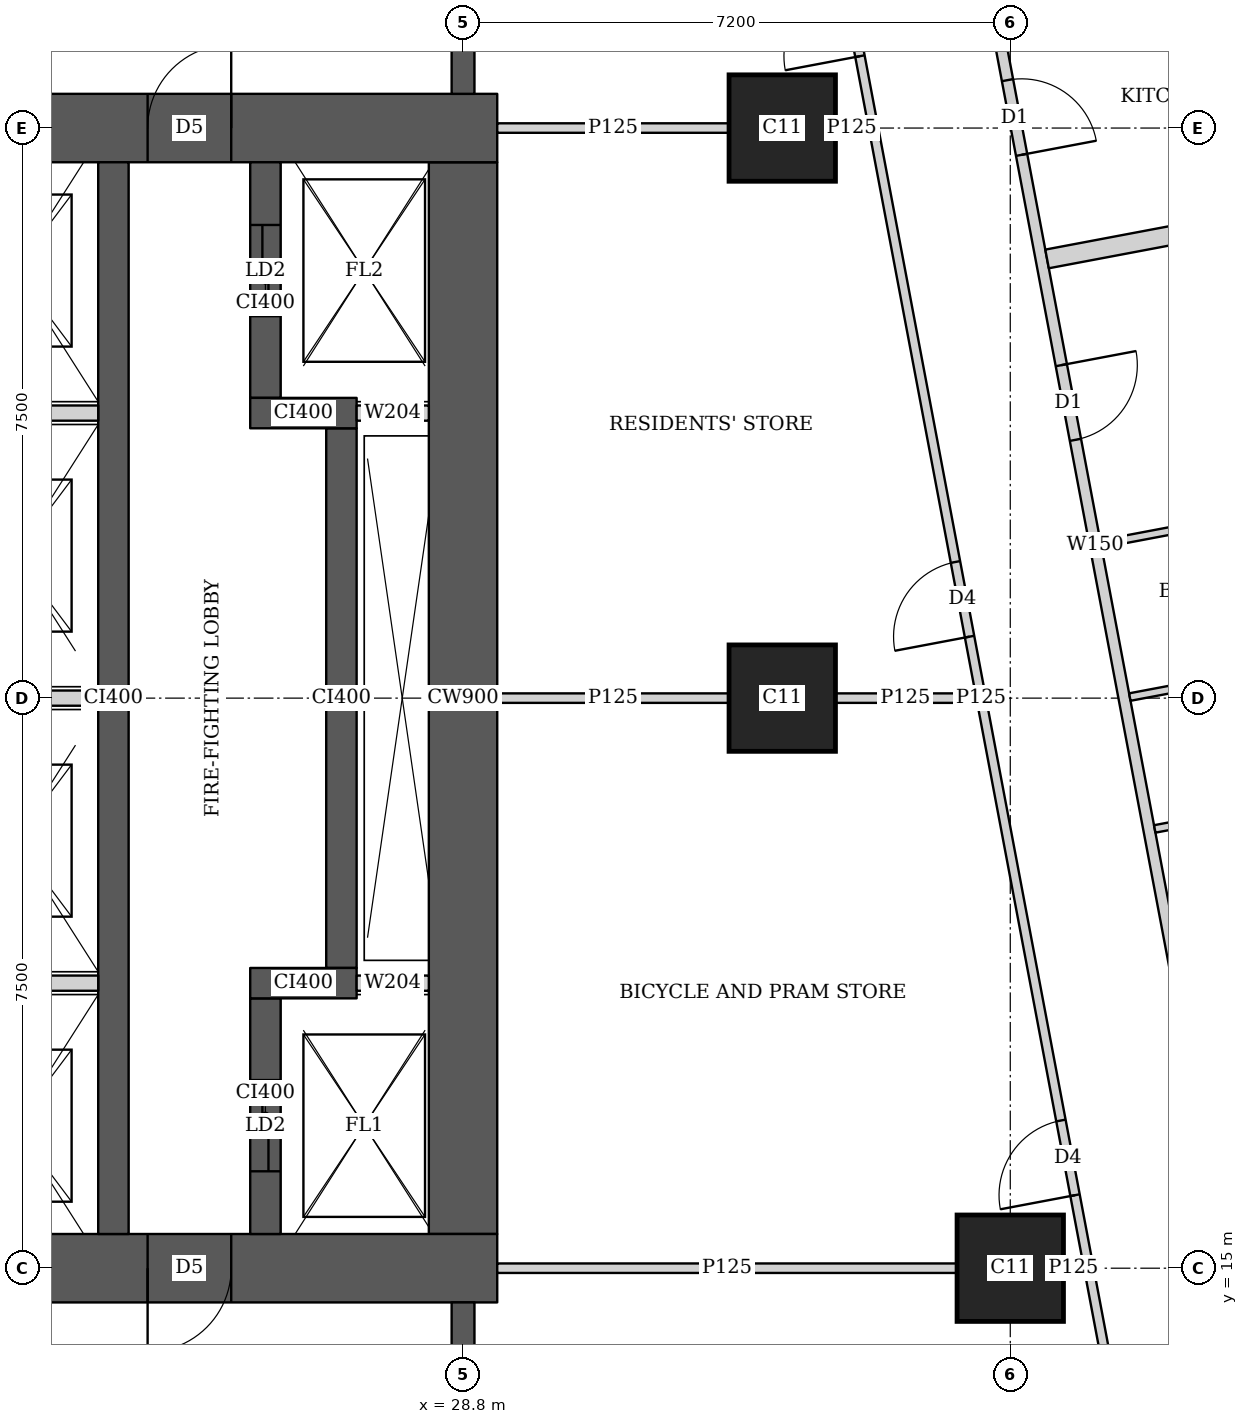
"""IFC4 building model, lengths in metres.
Left out: names, types, materials, properties, quantities, classifications, styles, units other than length and angle.
Written with IfcOpenShell. Run it as: python <this file> out.ifc"""

import sys

from ifc_helpers import new_model, si_unit, direction, frame, frame_2d, origin, origin_2d, place, context, subcontext, project, spatial, rectangle, extrude, element, fill, save


model = new_model("IFC4")
c1 = context("Model", 3, precision=1e-05, world=origin(), true_north=direction((0.0, 1.0)))
c2 = subcontext(c1, "Body", "Model", "MODEL_VIEW")
j1 = project(units=[si_unit("LENGTHUNIT", "METRE"), si_unit("PLANEANGLEUNIT", "RADIAN")], contexts=[c1])
p1 = place(None, origin())
s1 = spatial("IfcSite", under=j1, at=p1, CompositionType="ELEMENT")
p2 = place(p1, origin())
s2 = spatial("IfcBuilding", under=s1, at=p2, CompositionType="ELEMENT")
p3 = place(p2, frame((0.0, 0.0, 281.6)))
s3 = spatial("IfcBuildingStorey", under=s2, at=p3, CompositionType="ELEMENT", Elevation=281.6)
for number, where, z_axis, x_axis in (
    (1, (36.0, 15.0, 0.0), (0.0, 0.0, 1.0), (1.0, 0.0, 0.0)),
    (2, (33.0, 22.5, 0.0), (0.0, 0.0, 1.0), (1.0, 0.0, 0.0)),
    (3, (33.0, 30.0, 0.0), (0.0, 0.0, 1.0), (1.0, 0.0, 0.0)),
):
    element("IfcColumn", number, at=place(p3, frame(where, z_axis=z_axis, x_axis=x_axis)), inside=s3, PredefinedType="COLUMN", context=c2, shape_type="SweptSolid", body=[
        extrude(rectangle(XDim=1.4, YDim=1.4, at=origin_2d()), origin(), (0.0, 0.0, 1.0), 3.75),
    ])
p4 = place(p3, frame((13.95, 15.0, 0.0), z_axis=(0.0, 0.0, 1.0), x_axis=(1.0, 0.0, 0.0)))
e4 = element("IfcWall", 4, at=p4, inside=s3, PredefinedType="SHEAR", context=c2, shape_type="SweptSolid", body=[
    extrude(rectangle(XDim=15.3, YDim=0.9, at=frame_2d((7.65, 0.0))), origin(), (0.0, 0.0, 1.0), 3.75),
])
p5 = place(p4, frame((4.45, 0.0, 0.0)))
e5 = element("IfcOpeningElement", 5, at=p5, cuts=e4, PredefinedType="OPENING", context=c2, shape_type="SweptSolid", body=[
    extrude(rectangle(XDim=1.8, YDim=2.1, at=frame_2d((0.9, 1.05))), frame((0.0, 0.46, 0.0), z_axis=(0.0, -1.0, 0.0), x_axis=(1.0, 0.0, 0.0)), (0.0, 0.0, 1.0), 0.92),
])
p6 = place(p4, frame((10.7, 0.0, 0.0)))
e6 = element("IfcOpeningElement", 6, at=p6, cuts=e4, PredefinedType="OPENING", context=c2, shape_type="SweptSolid", body=[
    extrude(rectangle(XDim=1.1, YDim=2.1, at=frame_2d((0.55, 1.05))), frame((0.0, 0.46, 0.0), z_axis=(0.0, -1.0, 0.0), x_axis=(1.0, 0.0, 0.0)), (0.0, 0.0, 1.0), 0.92),
])
p7 = place(p3, frame((13.95, 30.0, 0.0), z_axis=(0.0, 0.0, 1.0), x_axis=(1.0, 0.0, 0.0)))
e7 = element("IfcWall", 7, at=p7, inside=s3, PredefinedType="SHEAR", context=c2, shape_type="SweptSolid", body=[
    extrude(rectangle(XDim=15.3, YDim=0.9, at=frame_2d((7.65, 0.0))), origin(), (0.0, 0.0, 1.0), 3.75),
])
p8 = place(p7, frame((4.45, 0.0, 0.0)))
e8 = element("IfcOpeningElement", 8, at=p8, cuts=e7, PredefinedType="OPENING", context=c2, shape_type="SweptSolid", body=[
    extrude(rectangle(XDim=1.8, YDim=2.1, at=frame_2d((0.9, 1.05))), frame((0.0, 0.46, 0.0), z_axis=(0.0, -1.0, 0.0), x_axis=(1.0, 0.0, 0.0)), (0.0, 0.0, 1.0), 0.92),
])
p9 = place(p7, frame((10.7, 0.0, 0.0)))
e9 = element("IfcOpeningElement", 9, at=p9, cuts=e7, PredefinedType="OPENING", context=c2, shape_type="SweptSolid", body=[
    extrude(rectangle(XDim=1.1, YDim=2.1, at=frame_2d((0.55, 1.05))), frame((0.0, 0.46, 0.0), z_axis=(0.0, -1.0, 0.0), x_axis=(1.0, 0.0, 0.0)), (0.0, 0.0, 1.0), 0.92),
])
p10 = place(p3, frame((28.8, 15.45, 0.0), z_axis=(0.0, 0.0, 1.0), x_axis=(0.0, 1.0, 0.0)))
e10 = element("IfcWall", 10, at=p10, inside=s3, PredefinedType="SHEAR", context=c2, shape_type="SweptSolid", body=[
    extrude(rectangle(XDim=14.1, YDim=0.9, at=frame_2d((7.05, 0.0))), origin(), (0.0, 0.0, 1.0), 3.75),
])
p11 = place(p3, frame((24.2, 15.45, 0.0), z_axis=(0.0, 0.0, 1.0), x_axis=(0.0, 1.0, 0.0)))
e11 = element("IfcWall", 11, at=p11, inside=s3, PredefinedType="SHEAR", context=c2, shape_type="SweptSolid", body=[
    extrude(rectangle(XDim=14.1, YDim=0.4, at=frame_2d((7.05, 0.0))), origin(), (0.0, 0.0, 1.0), 3.75),
])
p12 = place(p3, frame((26.2, 15.45, 0.0), z_axis=(0.0, 0.0, 1.0), x_axis=(0.0, 1.0, 0.0)))
e12 = element("IfcWall", 12, at=p12, inside=s3, PredefinedType="SHEAR", context=c2, shape_type="SweptSolid", body=[
    extrude(rectangle(XDim=3.1, YDim=0.4, at=frame_2d((1.55, 0.0))), origin(), (0.0, 0.0, 1.0), 3.75),
])
p13 = place(p12, frame((0.825, 0.0, 0.0)))
e13 = element("IfcOpeningElement", 13, at=p13, cuts=e12, PredefinedType="OPENING", context=c2, shape_type="SweptSolid", body=[
    extrude(rectangle(XDim=1.2, YDim=2.1, at=frame_2d((0.6, 1.05))), frame((0.0, 0.21, 0.0), z_axis=(0.0, -1.0, 0.0), x_axis=(1.0, 0.0, 0.0)), (0.0, 0.0, 1.0), 0.42),
])
p14 = place(p3, frame((26.0, 18.75, 0.0), z_axis=(0.0, 0.0, 1.0), x_axis=(1.0, 0.0, 0.0)))
e14 = element("IfcWall", 14, at=p14, inside=s3, PredefinedType="SHEAR", context=c2, shape_type="SweptSolid", body=[
    extrude(rectangle(XDim=1.4, YDim=0.4, at=frame_2d((0.7, 0.0))), origin(), (0.0, 0.0, 1.0), 3.75),
])
p15 = place(p3, frame((27.2, 18.95, 0.0), z_axis=(0.0, 0.0, 1.0), x_axis=(0.0, 1.0, 0.0)))
e15 = element("IfcWall", 15, at=p15, inside=s3, PredefinedType="SHEAR", context=c2, shape_type="SweptSolid", body=[
    extrude(rectangle(XDim=7.1, YDim=0.4, at=frame_2d((3.55, 0.0))), origin(), (0.0, 0.0, 1.0), 3.75),
])
p16 = place(p3, frame((26.0, 26.25, 0.0), z_axis=(0.0, 0.0, 1.0), x_axis=(1.0, 0.0, 0.0)))
e16 = element("IfcWall", 16, at=p16, inside=s3, PredefinedType="SHEAR", context=c2, shape_type="SweptSolid", body=[
    extrude(rectangle(XDim=1.4, YDim=0.4, at=frame_2d((0.7, 0.0))), origin(), (0.0, 0.0, 1.0), 3.75),
])
p17 = place(p3, frame((26.2, 26.45, 0.0), z_axis=(0.0, 0.0, 1.0), x_axis=(0.0, 1.0, 0.0)))
e17 = element("IfcWall", 17, at=p17, inside=s3, PredefinedType="SHEAR", context=c2, shape_type="SweptSolid", body=[
    extrude(rectangle(XDim=3.1, YDim=0.4, at=frame_2d((1.55, 0.0))), origin(), (0.0, 0.0, 1.0), 3.75),
])
p18 = place(p17, frame((1.075, 0.0, 0.0)))
e18 = element("IfcOpeningElement", 18, at=p18, cuts=e17, PredefinedType="OPENING", context=c2, shape_type="SweptSolid", body=[
    extrude(rectangle(XDim=1.2, YDim=2.1, at=frame_2d((0.6, 1.05))), frame((0.0, 0.21, 0.0), z_axis=(0.0, -1.0, 0.0), x_axis=(1.0, 0.0, 0.0)), (0.0, 0.0, 1.0), 0.42),
])
for number, where, z_axis, x_axis in (
    (19, (28.8, 10.35, 0.0), (0.0, 0.0, 1.0), (0.0, 1.0, 0.0)),
    (20, (28.8, 30.45, 0.0), (0.0, 0.0, 1.0), (0.0, 1.0, 0.0)),
):
    element("IfcWall", number, at=place(p3, frame(where, z_axis=z_axis, x_axis=x_axis)), inside=s3, PredefinedType="SHEAR", context=c2, shape_type="SweptSolid", body=[
        extrude(rectangle(XDim=4.2, YDim=0.3, at=frame_2d((2.1, 0.0))), origin(), (0.0, 0.0, 1.0), 3.75),
    ])
p19 = place(p3, frame((33.781, 42.186, 0.0), z_axis=(0.0, 0.0, 1.0), x_axis=(0.185593518645, -0.9826266055, 0.0)))
e21 = element("IfcWall", 21, at=p19, inside=s3, PredefinedType="SOLIDWALL", context=c2, shape_type="SweptSolid", body=[
    extrude(rectangle(XDim=35.961, YDim=0.15, at=frame_2d((17.98, 0.0))), origin(), (0.0, 0.0, 1.0), 2.5),
])
p20 = place(p19, frame((11.76, 0.0, 0.0)))
e22 = element("IfcOpeningElement", 22, at=p20, cuts=e21, PredefinedType="OPENING", context=c2, shape_type="SweptSolid", body=[
    extrude(rectangle(XDim=1.0, YDim=2.1, at=frame_2d((0.5, 1.05))), frame((0.0, 0.085, 0.0), z_axis=(0.0, -1.0, 0.0), x_axis=(1.0, 0.0, 0.0)), (0.0, 0.0, 1.0), 0.17),
])
p21 = place(p19, frame((15.576, 0.0, 0.0)))
e23 = element("IfcOpeningElement", 23, at=p21, cuts=e21, PredefinedType="OPENING", context=c2, shape_type="SweptSolid", body=[
    extrude(rectangle(XDim=1.0, YDim=2.1, at=frame_2d((0.5, 1.05))), frame((0.0, 0.085, 0.0), z_axis=(0.0, -1.0, 0.0), x_axis=(1.0, 0.0, 0.0)), (0.0, 0.0, 1.0), 0.17),
])
p22 = place(p19, frame((30.502, 0.0, 0.0)))
e24 = element("IfcOpeningElement", 24, at=p22, cuts=e21, PredefinedType="OPENING", context=c2, shape_type="SweptSolid", body=[
    extrude(rectangle(XDim=1.0, YDim=2.1, at=frame_2d((0.5, 1.05))), frame((0.0, 0.085, 0.0), z_axis=(0.0, -1.0, 0.0), x_axis=(1.0, 0.0, 0.0)), (0.0, 0.0, 1.0), 0.17),
])
p23 = place(p3, frame((40.657, 25.183, 0.0), z_axis=(0.0, 0.0, 1.0), x_axis=(-0.982585626838, -0.185810349366, 0.0)))
e25 = element("IfcWall", 25, at=p23, inside=s3, PredefinedType="PARTITIONING", context=c2, shape_type="SweptSolid", body=[
    extrude(rectangle(XDim=3.525, YDim=0.1, at=frame_2d((1.763, 0.0))), origin(), (0.0, 0.0, 1.0), 3.5),
])
p24 = place(p3, frame((41.365, 21.433, 0.0), z_axis=(0.0, 0.0, 1.0), x_axis=(-0.982638553676, -0.185530247748, 0.0)))
e26 = element("IfcWall", 26, at=p24, inside=s3, PredefinedType="PARTITIONING", context=c2, shape_type="SweptSolid", body=[
    extrude(rectangle(XDim=3.525, YDim=0.1, at=frame_2d((1.763, 0.0))), origin(), (0.0, 0.0, 1.0), 3.5),
])
p25 = place(p3, frame((41.037, 23.168, 0.0), z_axis=(0.0, 0.0, 1.0), x_axis=(-0.982638553676, -0.185530247748, 0.0)))
e27 = element("IfcWall", 27, at=p25, inside=s3, PredefinedType="PARTITIONING", context=c2, shape_type="SweptSolid", body=[
    extrude(rectangle(XDim=3.525, YDim=0.1, at=frame_2d((1.763, 0.0))), origin(), (0.0, 0.0, 1.0), 2.5),
])
p26 = place(p3, frame((41.177, 29.164, 0.0), z_axis=(0.0, 0.0, 1.0), x_axis=(-0.982642846239, -0.185507511263, 0.0)))
e28 = element("IfcWall", 28, at=p26, inside=s3, PredefinedType="SOLIDWALL", context=c2, shape_type="SweptSolid", body=[
    extrude(rectangle(XDim=4.776, YDim=0.25, at=frame_2d((2.388, 0.0))), origin(), (0.0, 0.0, 1.0), 2.5),
])
p27 = place(p3, frame((37.947, 10.163, 0.0), z_axis=(0.0, 0.0, 1.0), x_axis=(-0.185572770922, 0.982630523998, 0.0)))
e29 = element("IfcWall", 29, at=p27, inside=s3, PredefinedType="PARTITIONING", context=c2, shape_type="SweptSolid", body=[
    extrude(rectangle(XDim=25.111, YDim=0.125, at=frame_2d((12.556, 0.0))), origin(), (0.0, 0.0, 1.0), 2.5),
])
p28 = place(p27, frame((0.708, 0.0, 0.0)))
e30 = element("IfcOpeningElement", 30, at=p28, cuts=e29, PredefinedType="OPENING", context=c2, shape_type="SweptSolid", body=[
    extrude(rectangle(XDim=1.0, YDim=2.1, at=frame_2d((0.5, 1.05))), frame((0.0, 0.073, 0.0), z_axis=(0.0, -1.0, 0.0), x_axis=(1.0, 0.0, 0.0)), (0.0, 0.0, 1.0), 0.145),
])
p29 = place(p27, frame((5.9, 0.0, 0.0)))
e31 = element("IfcOpeningElement", 31, at=p29, cuts=e29, PredefinedType="OPENING", context=c2, shape_type="SweptSolid", body=[
    extrude(rectangle(XDim=1.0, YDim=2.1, at=frame_2d((0.5, 1.05))), frame((0.0, 0.073, 0.0), z_axis=(0.0, -1.0, 0.0), x_axis=(1.0, 0.0, 0.0)), (0.0, 0.0, 1.0), 0.145),
])
p30 = place(p27, frame((13.378, 0.0, 0.0)))
e32 = element("IfcOpeningElement", 32, at=p30, cuts=e29, PredefinedType="OPENING", context=c2, shape_type="SweptSolid", body=[
    extrude(rectangle(XDim=1.0, YDim=2.1, at=frame_2d((0.5, 1.05))), frame((0.0, 0.073, 0.0), z_axis=(0.0, -1.0, 0.0), x_axis=(1.0, 0.0, 0.0)), (0.0, 0.0, 1.0), 0.145),
])
p31 = place(p27, frame((21.15, 0.0, 0.0)))
e33 = element("IfcOpeningElement", 33, at=p31, cuts=e29, PredefinedType="OPENING", context=c2, shape_type="SweptSolid", body=[
    extrude(rectangle(XDim=1.0, YDim=2.1, at=frame_2d((0.5, 1.05))), frame((0.0, 0.073, 0.0), z_axis=(0.0, -1.0, 0.0), x_axis=(1.0, 0.0, 0.0)), (0.0, 0.0, 1.0), 0.145),
])
p32 = place(p3, frame((29.25, 15.0, 0.0), z_axis=(0.0, 0.0, 1.0), x_axis=(1.0, 0.0, 0.0)))
e34 = element("IfcWall", 34, at=p32, inside=s3, PredefinedType="PARTITIONING", context=c2, shape_type="SweptSolid", body=[
    extrude(rectangle(XDim=6.049, YDim=0.125, at=frame_2d((3.024, 0.0))), origin(), (0.0, 0.0, 1.0), 3.5),
])
p33 = place(p3, frame((36.701, 15.0, 0.0), z_axis=(0.0, 0.0, 1.0), x_axis=(1.0, 0.0, 0.0)))
e35 = element("IfcWall", 35, at=p33, inside=s3, PredefinedType="PARTITIONING", context=c2, shape_type="SweptSolid", body=[
    extrude(rectangle(XDim=0.257, YDim=0.125, at=frame_2d((0.128, 0.0))), origin(), (0.0, 0.0, 1.0), 3.5),
])
p34 = place(p3, frame((29.25, 22.5, 0.0), z_axis=(0.0, 0.0, 1.0), x_axis=(1.0, 0.0, 0.0)))
e36 = element("IfcWall", 36, at=p34, inside=s3, PredefinedType="PARTITIONING", context=c2, shape_type="SweptSolid", body=[
    extrude(rectangle(XDim=3.049, YDim=0.125, at=frame_2d((1.524, 0.0))), origin(), (0.0, 0.0, 1.0), 3.5),
])
p35 = place(p3, frame((33.701, 22.5, 0.0), z_axis=(0.0, 0.0, 1.0), x_axis=(1.0, 0.0, 0.0)))
e37 = element("IfcWall", 37, at=p35, inside=s3, PredefinedType="PARTITIONING", context=c2, shape_type="SweptSolid", body=[
    extrude(rectangle(XDim=1.841, YDim=0.125, at=frame_2d((0.92, 0.0))), origin(), (0.0, 0.0, 1.0), 2.5),
])
p36 = place(p3, frame((29.25, 30.0, 0.0), z_axis=(0.0, 0.0, 1.0), x_axis=(1.0, 0.0, 0.0)))
e38 = element("IfcWall", 38, at=p36, inside=s3, PredefinedType="PARTITIONING", context=c2, shape_type="SweptSolid", body=[
    extrude(rectangle(XDim=3.049, YDim=0.125, at=frame_2d((1.524, 0.0))), origin(), (0.0, 0.0, 1.0), 3.5),
])
p37 = place(p3, frame((33.701, 30.0, 0.0), z_axis=(0.0, 0.0, 1.0), x_axis=(1.0, 0.0, 0.0)))
e39 = element("IfcWall", 39, at=p37, inside=s3, PredefinedType="PARTITIONING", context=c2, shape_type="SweptSolid", body=[
    extrude(rectangle(XDim=0.424, YDim=0.125, at=frame_2d((0.212, 0.0))), origin(), (0.0, 0.0, 1.0), 2.5),
])
for number, where, z_axis, x_axis in (
    (40, (21.8, 18.75, 0.0), (0.0, 0.0, 1.0), (1.0, 0.0, 0.0)),
    (41, (21.8, 22.5, 0.0), (0.0, 0.0, 1.0), (1.0, 0.0, 0.0)),
    (42, (21.8, 26.25, 0.0), (0.0, 0.0, 1.0), (1.0, 0.0, 0.0)),
):
    element("IfcWall", number, at=place(p3, frame(where, z_axis=z_axis, x_axis=x_axis)), inside=s3, PredefinedType="SOLIDWALL", context=c2, shape_type="SweptSolid", body=[
        extrude(rectangle(XDim=2.2, YDim=0.2, at=frame_2d((1.1, 0.0))), origin(), (0.0, 0.0, 1.0), 3.5),
    ])
for number, where, z_axis, x_axis in (
    (43, (27.4, 18.75, 0.0), (0.0, 0.0, 1.0), (1.0, 0.0, 0.0)),
    (44, (27.4, 26.25, 0.0), (0.0, 0.0, 1.0), (1.0, 0.0, 0.0)),
):
    element("IfcWall", number, at=place(p3, frame(where, z_axis=z_axis, x_axis=x_axis)), inside=s3, PredefinedType="SOLIDWALL", context=c2, shape_type="SweptSolid", body=[
        extrude(rectangle(XDim=0.95, YDim=0.2, at=frame_2d((0.475, 0.0))), origin(), (0.0, 0.0, 1.0), 3.5),
    ])
p38 = place(p20, origin())
e45 = element("IfcDoor", 45, at=p38, inside=s3, OperationType="SINGLE_SWING_RIGHT", PredefinedType="DOOR", context=c2, shape_type="SweptSolid", body=[
    extrude(rectangle(XDim=1.0, YDim=2.1, at=frame_2d((0.5, 1.05))), frame((0.0, 0.025, 0.0), z_axis=(0.0, -1.0, 0.0), x_axis=(1.0, 0.0, 0.0)), (0.0, 0.0, 1.0), 0.05),
])
fill(e22, e45)
p39 = place(p21, origin())
e46 = element("IfcDoor", 46, at=p39, inside=s3, OperationType="SINGLE_SWING_LEFT", PredefinedType="DOOR", context=c2, shape_type="SweptSolid", body=[
    extrude(rectangle(XDim=1.0, YDim=2.1, at=frame_2d((0.5, 1.05))), frame((0.0, 0.025, 0.0), z_axis=(0.0, -1.0, 0.0), x_axis=(1.0, 0.0, 0.0)), (0.0, 0.0, 1.0), 0.05),
])
fill(e23, e46)
p40 = place(p29, origin())
e47 = element("IfcDoor", 47, at=p40, inside=s3, OperationType="SINGLE_SWING_LEFT", PredefinedType="DOOR", context=c2, shape_type="SweptSolid", body=[
    extrude(rectangle(XDim=1.0, YDim=2.1, at=frame_2d((0.5, 1.05))), frame((0.0, 0.025, 0.0), z_axis=(0.0, -1.0, 0.0), x_axis=(1.0, 0.0, 0.0)), (0.0, 0.0, 1.0), 0.05),
])
fill(e31, e47)
p41 = place(p30, origin())
e48 = element("IfcDoor", 48, at=p41, inside=s3, OperationType="SINGLE_SWING_LEFT", PredefinedType="DOOR", context=c2, shape_type="SweptSolid", body=[
    extrude(rectangle(XDim=1.0, YDim=2.1, at=frame_2d((0.5, 1.05))), frame((0.0, 0.025, 0.0), z_axis=(0.0, -1.0, 0.0), x_axis=(1.0, 0.0, 0.0)), (0.0, 0.0, 1.0), 0.05),
])
fill(e32, e48)
p42 = place(p31, origin())
e49 = element("IfcDoor", 49, at=p42, inside=s3, OperationType="SINGLE_SWING_LEFT", PredefinedType="DOOR", context=c2, shape_type="SweptSolid", body=[
    extrude(rectangle(XDim=1.0, YDim=2.1, at=frame_2d((0.5, 1.05))), frame((0.0, 0.025, 0.0), z_axis=(0.0, -1.0, 0.0), x_axis=(1.0, 0.0, 0.0)), (0.0, 0.0, 1.0), 0.05),
])
fill(e33, e49)
p43 = place(p6, origin())
e50 = element("IfcDoor", 50, at=p43, inside=s3, OperationType="SINGLE_SWING_RIGHT", PredefinedType="DOOR", context=c2, shape_type="SweptSolid", body=[
    extrude(rectangle(XDim=1.1, YDim=2.1, at=frame_2d((0.55, 1.05))), frame((0.0, 0.025, 0.0), z_axis=(0.0, -1.0, 0.0), x_axis=(1.0, 0.0, 0.0)), (0.0, 0.0, 1.0), 0.05),
])
fill(e6, e50)
p44 = place(p9, origin())
e51 = element("IfcDoor", 51, at=p44, inside=s3, OperationType="SINGLE_SWING_RIGHT", PredefinedType="DOOR", context=c2, shape_type="SweptSolid", body=[
    extrude(rectangle(XDim=1.1, YDim=2.1, at=frame_2d((0.55, 1.05))), frame((0.0, 0.025, 0.0), z_axis=(0.0, -1.0, 0.0), x_axis=(1.0, 0.0, 0.0)), (0.0, 0.0, 1.0), 0.05),
])
fill(e9, e51)
p45 = place(p13, origin())
e52 = element("IfcDoor", 52, at=p45, inside=s3, OperationType="DOUBLE_DOOR_SLIDING", PredefinedType="DOOR", context=c2, shape_type="SweptSolid", body=[
    extrude(rectangle(XDim=1.2, YDim=2.1, at=frame_2d((0.6, 1.05))), frame((0.0, 0.025, 0.0), z_axis=(0.0, -1.0, 0.0), x_axis=(1.0, 0.0, 0.0)), (0.0, 0.0, 1.0), 0.05),
])
fill(e13, e52)
p46 = place(p18, origin())
e53 = element("IfcDoor", 53, at=p46, inside=s3, OperationType="DOUBLE_DOOR_SLIDING", PredefinedType="DOOR", context=c2, shape_type="SweptSolid", body=[
    extrude(rectangle(XDim=1.2, YDim=2.1, at=frame_2d((0.6, 1.05))), frame((0.0, 0.025, 0.0), z_axis=(0.0, -1.0, 0.0), x_axis=(1.0, 0.0, 0.0)), (0.0, 0.0, 1.0), 0.05),
])
fill(e18, e53)
save(model, sys.argv[1])
